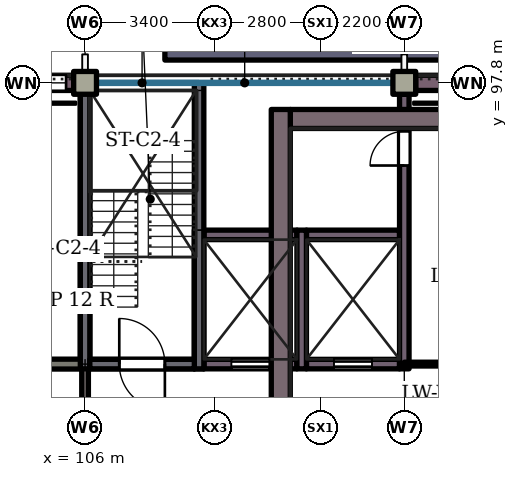
"""IFC4 building model, lengths in metres.
Left out: names, types, materials, properties, quantities, classifications, styles, units other than length and angle.
Written with IfcOpenShell. Run it as: python <this file> out.ifc"""

import sys

from ifc_helpers import new_model, si_unit, direction, frame, frame_2d, origin, origin_2d, place, context, subcontext, project, spatial, rectangle, extrude, element, fill, save


model = new_model("IFC4")
c1 = context("Model", 3, precision=1e-05, world=origin(), true_north=direction((0.0, 1.0)))
c2 = subcontext(c1, "Body", "Model", "MODEL_VIEW")
j1 = project(units=[si_unit("LENGTHUNIT", "METRE"), si_unit("PLANEANGLEUNIT", "RADIAN")], contexts=[c1])
p1 = place(None, origin())
s1 = spatial("IfcSite", under=j1, at=p1, CompositionType="ELEMENT")
p2 = place(p1, origin())
s2 = spatial("IfcBuilding", under=s1, at=p2, CompositionType="ELEMENT")
p3 = place(p2, frame((0.0, 0.0, 16.8)))
s3 = spatial("IfcBuildingStorey", under=s2, at=p3, CompositionType="ELEMENT", Elevation=16.8)
for number, where, z_axis, x_axis in (
    (1, (106.0, 97.8, 0.0), (0.0, 0.0, 1.0), (1.0, 0.0, 0.0)),
    (2, (114.4, 97.8, 0.0), (0.0, 0.0, 1.0), (1.0, 0.0, 0.0)),
):
    element("IfcColumn", number, at=place(p3, frame(where, z_axis=z_axis, x_axis=x_axis)), inside=s3, PredefinedType="COLUMN", context=c2, shape_type="SweptSolid", body=[
        extrude(rectangle(XDim=0.6, YDim=0.6, at=origin_2d()), origin(), (0.0, 0.0, 1.0), 4.2),
    ])
p4 = place(p3, frame((106.125, 90.4, 0.0), z_axis=(0.0, 0.0, 1.0), x_axis=(1.0, 0.0, 0.0)))
e3 = element("IfcWall", 3, at=p4, inside=s3, PredefinedType="SHEAR", context=c2, shape_type="SweptSolid", body=[
    extrude(rectangle(XDim=2.75, YDim=0.25, at=frame_2d((1.375, 0.0))), origin(), (0.0, 0.0, 1.0), 4.2),
])
p5 = place(p4, frame((0.775, 0.0, 0.0)))
e4 = element("IfcOpeningElement", 4, at=p5, cuts=e3, PredefinedType="OPENING", context=c2, shape_type="SweptSolid", body=[
    extrude(rectangle(XDim=1.2, YDim=2.1, at=frame_2d((0.6, 1.05))), frame((0.0, 0.135, 0.0), z_axis=(0.0, -1.0, 0.0), x_axis=(1.0, 0.0, 0.0)), (0.0, 0.0, 1.0), 0.27),
])
p6 = place(p3, frame((109.125, 90.4, 0.0), z_axis=(0.0, 0.0, 1.0), x_axis=(1.0, 0.0, 0.0)))
e5 = element("IfcWall", 5, at=p6, inside=s3, PredefinedType="SHEAR", context=c2, shape_type="SweptSolid", body=[
    extrude(rectangle(XDim=2.45, YDim=0.25, at=frame_2d((1.225, 0.0))), origin(), (0.0, 0.0, 1.0), 4.2),
])
p7 = place(p6, frame((0.725, 0.0, 0.0)))
e6 = element("IfcOpeningElement", 6, at=p7, cuts=e5, PredefinedType="OPENING", context=c2, shape_type="SweptSolid", body=[
    extrude(rectangle(XDim=1.0, YDim=2.1, at=frame_2d((0.5, 1.05))), frame((0.0, 0.135, 0.0), z_axis=(0.0, -1.0, 0.0), x_axis=(1.0, 0.0, 0.0)), (0.0, 0.0, 1.0), 0.27),
])
p8 = place(p3, frame((111.825, 90.4, 0.0), z_axis=(0.0, 0.0, 1.0), x_axis=(1.0, 0.0, 0.0)))
e7 = element("IfcWall", 7, at=p8, inside=s3, PredefinedType="SHEAR", context=c2, shape_type="SweptSolid", body=[
    extrude(rectangle(XDim=2.45, YDim=0.25, at=frame_2d((1.225, 0.0))), origin(), (0.0, 0.0, 1.0), 4.2),
])
p9 = place(p8, frame((0.725, 0.0, 0.0)))
e8 = element("IfcOpeningElement", 8, at=p9, cuts=e7, PredefinedType="OPENING", context=c2, shape_type="SweptSolid", body=[
    extrude(rectangle(XDim=1.0, YDim=2.1, at=frame_2d((0.5, 1.05))), frame((0.0, 0.135, 0.0), z_axis=(0.0, -1.0, 0.0), x_axis=(1.0, 0.0, 0.0)), (0.0, 0.0, 1.0), 0.27),
])
for number, where, z_axis, x_axis in (
    (9, (109.125, 93.8, 0.0), (0.0, 0.0, 1.0), (1.0, 0.0, 0.0)),
    (10, (111.825, 93.8, 0.0), (0.0, 0.0, 1.0), (1.0, 0.0, 0.0)),
):
    element("IfcWall", number, at=place(p3, frame(where, z_axis=z_axis, x_axis=x_axis)), inside=s3, PredefinedType="SHEAR", context=c2, shape_type="SweptSolid", body=[
        extrude(rectangle(XDim=2.45, YDim=0.25, at=frame_2d((1.225, 0.0))), origin(), (0.0, 0.0, 1.0), 4.2),
    ])
p10 = place(p3, frame((106.0, 90.275, 0.0), z_axis=(0.0, 0.0, 1.0), x_axis=(0.0, 1.0, 0.0)))
e11 = element("IfcWall", 11, at=p10, inside=s3, PredefinedType="SHEAR", context=c2, shape_type="SweptSolid", body=[
    extrude(rectangle(XDim=7.225, YDim=0.25, at=frame_2d((3.613, 0.0))), origin(), (0.0, 0.0, 1.0), 4.2),
])
for number, where, z_axis, x_axis in (
    (12, (109.0, 90.275, 0.0), (0.0, 0.0, 1.0), (0.0, 1.0, 0.0)),
    (13, (111.7, 90.275, 0.0), (0.0, 0.0, 1.0), (0.0, 1.0, 0.0)),
):
    element("IfcWall", number, at=place(p3, frame(where, z_axis=z_axis, x_axis=x_axis)), inside=s3, PredefinedType="SHEAR", context=c2, shape_type="SweptSolid", body=[
        extrude(rectangle(XDim=3.65, YDim=0.25, at=frame_2d((1.825, 0.0))), origin(), (0.0, 0.0, 1.0), 4.2),
    ])
p11 = place(p3, frame((114.4, 90.275, 0.0), z_axis=(0.0, 0.0, 1.0), x_axis=(0.0, 1.0, 0.0)))
e14 = element("IfcWall", 14, at=p11, inside=s3, PredefinedType="SHEAR", context=c2, shape_type="SweptSolid", body=[
    extrude(rectangle(XDim=7.225, YDim=0.25, at=frame_2d((3.613, 0.0))), origin(), (0.0, 0.0, 1.0), 4.2),
])
p12 = place(p11, frame((5.35, 0.0, 0.0)))
e15 = element("IfcOpeningElement", 15, at=p12, cuts=e14, PredefinedType="OPENING", context=c2, shape_type="SweptSolid", body=[
    extrude(rectangle(XDim=0.9, YDim=2.1, at=frame_2d((0.45, 1.05))), frame((0.0, 0.135, 0.0), z_axis=(0.0, -1.0, 0.0), x_axis=(1.0, 0.0, 0.0)), (0.0, 0.0, 1.0), 0.27),
])
p13 = place(p3, frame((97.9, 97.8, 0.0), z_axis=(0.0, 0.0, 1.0), x_axis=(1.0, 0.0, 0.0)))
e16 = element("IfcWall", 16, at=p13, inside=s3, PredefinedType="SOLIDWALL", context=c2, shape_type="SweptSolid", body=[
    extrude(rectangle(XDim=7.8, YDim=0.4, at=frame_2d((3.9, 0.0))), origin(), (0.0, 0.0, 1.0), 3.3),
])
p14 = place(p13, frame((0.2, 0.0, 0.9)))
e17 = element("IfcOpeningElement", 17, at=p14, cuts=e16, PredefinedType="OPENING", context=c2, shape_type="SweptSolid", body=[
    extrude(rectangle(XDim=1.8, YDim=2.1, at=frame_2d((0.9, 1.05))), frame((0.0, 0.21, 0.0), z_axis=(0.0, -1.0, 0.0), x_axis=(1.0, 0.0, 0.0)), (0.0, 0.0, 1.0), 0.42),
])
p15 = place(p13, frame((3.0, 0.0, 0.9)))
e18 = element("IfcOpeningElement", 18, at=p15, cuts=e16, PredefinedType="OPENING", context=c2, shape_type="SweptSolid", body=[
    extrude(rectangle(XDim=1.8, YDim=2.1, at=frame_2d((0.9, 1.05))), frame((0.0, 0.21, 0.0), z_axis=(0.0, -1.0, 0.0), x_axis=(1.0, 0.0, 0.0)), (0.0, 0.0, 1.0), 0.42),
])
p16 = place(p13, frame((5.8, 0.0, 0.9)))
e19 = element("IfcOpeningElement", 19, at=p16, cuts=e16, PredefinedType="OPENING", context=c2, shape_type="SweptSolid", body=[
    extrude(rectangle(XDim=1.8, YDim=2.1, at=frame_2d((0.9, 1.05))), frame((0.0, 0.21, 0.0), z_axis=(0.0, -1.0, 0.0), x_axis=(1.0, 0.0, 0.0)), (0.0, 0.0, 1.0), 0.42),
])
p17 = place(p3, frame((114.7, 97.8, 0.0), z_axis=(0.0, 0.0, 1.0), x_axis=(1.0, 0.0, 0.0)))
e20 = element("IfcWall", 20, at=p17, inside=s3, PredefinedType="SOLIDWALL", context=c2, shape_type="SweptSolid", body=[
    extrude(rectangle(XDim=7.8, YDim=0.4, at=frame_2d((3.9, 0.0))), origin(), (0.0, 0.0, 1.0), 3.3),
])
p18 = place(p17, frame((0.8, 0.0, 2.1)))
e21 = element("IfcOpeningElement", 21, at=p18, cuts=e20, PredefinedType="OPENING", context=c2, shape_type="SweptSolid", body=[
    extrude(rectangle(XDim=0.6, YDim=0.9, at=frame_2d((0.3, 0.45))), frame((0.0, 0.21, 0.0), z_axis=(0.0, -1.0, 0.0), x_axis=(1.0, 0.0, 0.0)), (0.0, 0.0, 1.0), 0.42),
])
p19 = place(p17, frame((3.525, 0.0, 2.1)))
e22 = element("IfcOpeningElement", 22, at=p19, cuts=e20, PredefinedType="OPENING", context=c2, shape_type="SweptSolid", body=[
    extrude(rectangle(XDim=0.75, YDim=0.9, at=frame_2d((0.375, 0.45))), frame((0.0, 0.21, 0.0), z_axis=(0.0, -1.0, 0.0), x_axis=(1.0, 0.0, 0.0)), (0.0, 0.0, 1.0), 0.42),
])
p20 = place(p17, frame((6.4, 0.0, 2.1)))
e23 = element("IfcOpeningElement", 23, at=p20, cuts=e20, PredefinedType="OPENING", context=c2, shape_type="SweptSolid", body=[
    extrude(rectangle(XDim=0.6, YDim=0.9, at=frame_2d((0.3, 0.45))), frame((0.0, 0.21, 0.0), z_axis=(0.0, -1.0, 0.0), x_axis=(1.0, 0.0, 0.0)), (0.0, 0.0, 1.0), 0.42),
])
p21 = place(p3, frame((111.4, 96.85, 4.2), z_axis=(0.0, 0.0, 1.0), x_axis=(1.0, 0.0, 0.0)))
e24 = element("IfcWall", 24, at=p21, inside=s3, PredefinedType="SOLIDWALL", context=c2, shape_type="SweptSolid", body=[
    extrude(rectangle(XDim=9.0, YDim=0.5, at=frame_2d((4.5, 0.0))), origin(), (0.0, 0.0, 1.0), 0.9),
])
p22 = place(p3, frame((111.15, 88.3, 4.2), z_axis=(0.0, 0.0, 1.0), x_axis=(0.0, 1.0, 0.0)))
e25 = element("IfcWall", 25, at=p22, inside=s3, PredefinedType="SOLIDWALL", context=c2, shape_type="SweptSolid", body=[
    extrude(rectangle(XDim=8.8, YDim=0.5, at=frame_2d((4.4, 0.0))), origin(), (0.0, 0.0, 1.0), 0.9),
])
p23 = place(p3, frame((108.1, 98.9, 0.0), z_axis=(0.0, 0.0, 1.0), x_axis=(1.0, 0.0, 0.0)))
e26 = element("IfcWall", 26, at=p23, inside=s3, PredefinedType="STANDARD", context=c2, shape_type="SweptSolid", body=[
    extrude(rectangle(XDim=12.6, YDim=1.0, at=frame_2d((6.3, 0.0))), origin(), (0.0, 0.0, 1.0), 0.6),
])
p24 = place(p3, frame((97.6, 90.4, 0.0), z_axis=(0.0, 0.0, 1.0), x_axis=(1.0, 0.0, 0.0)))
e27 = element("IfcWall", 27, at=p24, inside=s3, PredefinedType="PARTITIONING", context=c2, shape_type="SweptSolid", body=[
    extrude(rectangle(XDim=8.4, YDim=0.26, at=frame_2d((4.2, 0.0))), origin(), (0.0, 0.0, 1.0), 3.9),
])
p25 = place(p24, frame((3.45, 0.0, 0.0)))
e28 = element("IfcOpeningElement", 28, at=p25, cuts=e27, PredefinedType="OPENING", context=c2, shape_type="SweptSolid", body=[
    extrude(rectangle(XDim=1.5, YDim=2.1, at=frame_2d((0.75, 1.05))), frame((0.0, 0.14, 0.0), z_axis=(0.0, -1.0, 0.0), x_axis=(1.0, 0.0, 0.0)), (0.0, 0.0, 1.0), 0.28),
])
p26 = place(p3, frame((114.4, 90.4, 0.0), z_axis=(0.0, 0.0, 1.0), x_axis=(1.0, 0.0, 0.0)))
e29 = element("IfcWall", 29, at=p26, inside=s3, PredefinedType="PARTITIONING", context=c2, shape_type="SweptSolid", body=[
    extrude(rectangle(XDim=8.4, YDim=0.1, at=frame_2d((4.2, 0.0))), origin(), (0.0, 0.0, 1.0), 3.9),
])
p27 = place(p26, frame((1.35, 0.0, 0.0)))
e30 = element("IfcOpeningElement", 30, at=p27, cuts=e29, PredefinedType="OPENING", context=c2, shape_type="SweptSolid", body=[
    extrude(rectangle(XDim=0.9, YDim=2.1, at=frame_2d((0.45, 1.05))), frame((0.0, 0.06, 0.0), z_axis=(0.0, -1.0, 0.0), x_axis=(1.0, 0.0, 0.0)), (0.0, 0.0, 1.0), 0.12),
])
p28 = place(p26, frame((4.225, 0.0, 0.0)))
e31 = element("IfcOpeningElement", 31, at=p28, cuts=e29, PredefinedType="OPENING", context=c2, shape_type="SweptSolid", body=[
    extrude(rectangle(XDim=1.15, YDim=2.1, at=frame_2d((0.575, 1.05))), frame((0.0, 0.06, 0.0), z_axis=(0.0, -1.0, 0.0), x_axis=(1.0, 0.0, 0.0)), (0.0, 0.0, 1.0), 0.12),
])
p29 = place(p26, frame((6.15, 0.0, 0.0)))
e32 = element("IfcOpeningElement", 32, at=p29, cuts=e29, PredefinedType="OPENING", context=c2, shape_type="SweptSolid", body=[
    extrude(rectangle(XDim=0.9, YDim=2.1, at=frame_2d((0.45, 1.05))), frame((0.0, 0.06, 0.0), z_axis=(0.0, -1.0, 0.0), x_axis=(1.0, 0.0, 0.0)), (0.0, 0.0, 1.0), 0.12),
])
p30 = place(p3, frame((106.0, 87.9, 0.0), z_axis=(0.0, 0.0, 1.0), x_axis=(0.0, 1.0, 0.0)))
e33 = element("IfcWall", 33, at=p30, inside=s3, PredefinedType="PARTITIONING", context=c2, shape_type="SweptSolid", body=[
    extrude(rectangle(XDim=2.5, YDim=0.175, at=frame_2d((1.25, 0.0))), origin(), (0.0, 0.0, 1.0), 3.0),
])
p31 = place(p3, frame((109.0, 93.925, 0.0), z_axis=(0.0, 0.0, 1.0), x_axis=(0.0, 1.0, 0.0)))
e34 = element("IfcWall", 34, at=p31, inside=s3, PredefinedType="PARTITIONING", context=c2, shape_type="SweptSolid", body=[
    extrude(rectangle(XDim=3.675, YDim=0.15, at=frame_2d((1.837, 0.0))), origin(), (0.0, 0.0, 1.0), 3.9),
])
for number, where, z_axis, x_axis in (
    (35, (106.0, 90.275, 4.2), (0.0, 0.0, 1.0), (0.0, 1.0, 0.0)),
    (36, (109.0, 90.275, 4.2), (0.0, 0.0, 1.0), (0.0, 1.0, 0.0)),
):
    element("IfcWall", number, at=place(p3, frame(where, z_axis=z_axis, x_axis=x_axis)), inside=s3, PredefinedType="SHEAR", context=c2, shape_type="SweptSolid", body=[
        extrude(rectangle(XDim=7.525, YDim=0.25, at=frame_2d((3.763, 0.0))), origin(), (0.0, 0.0, 1.0), 3.5),
    ])
p32 = place(p3, frame((106.125, 90.4, 4.2), z_axis=(0.0, 0.0, 1.0), x_axis=(1.0, 0.0, 0.0)))
e37 = element("IfcWall", 37, at=p32, inside=s3, PredefinedType="SHEAR", context=c2, shape_type="SweptSolid", body=[
    extrude(rectangle(XDim=2.75, YDim=0.25, at=frame_2d((1.375, 0.0))), origin(), (0.0, 0.0, 1.0), 3.5),
])
p33 = place(p32, frame((0.775, 0.0, 0.0)))
e38 = element("IfcOpeningElement", 38, at=p33, cuts=e37, PredefinedType="OPENING", context=c2, shape_type="SweptSolid", body=[
    extrude(rectangle(XDim=1.2, YDim=2.1, at=frame_2d((0.6, 1.05))), frame((0.0, 0.135, 0.0), z_axis=(0.0, -1.0, 0.0), x_axis=(1.0, 0.0, 0.0)), (0.0, 0.0, 1.0), 0.27),
])
p34 = place(p16, origin())
e39 = element("IfcWindow", 39, at=p34, inside=s3, PartitioningType="SINGLE_PANEL", PredefinedType="WINDOW", context=c2, shape_type="SweptSolid", body=[
    extrude(rectangle(XDim=1.8, YDim=2.1, at=frame_2d((0.9, 1.05))), frame((0.0, 0.03, 0.0), z_axis=(0.0, -1.0, 0.0), x_axis=(1.0, 0.0, 0.0)), (0.0, 0.0, 1.0), 0.06),
])
fill(e19, e39)
p35 = place(p12, origin())
e40 = element("IfcDoor", 40, at=p35, inside=s3, OperationType="SINGLE_SWING_LEFT", PredefinedType="DOOR", context=c2, shape_type="SweptSolid", body=[
    extrude(rectangle(XDim=0.9, YDim=2.1, at=frame_2d((0.45, 1.05))), frame((0.0, 0.025, 0.0), z_axis=(0.0, -1.0, 0.0), x_axis=(1.0, 0.0, 0.0)), (0.0, 0.0, 1.0), 0.05),
])
fill(e15, e40)
p36 = place(p5, origin())
e41 = element("IfcDoor", 41, at=p36, inside=s3, OperationType="SINGLE_SWING_LEFT", PredefinedType="DOOR", context=c2, shape_type="SweptSolid", body=[
    extrude(rectangle(XDim=1.2, YDim=2.1, at=frame_2d((0.6, 1.05))), frame((0.0, 0.025, 0.0), z_axis=(0.0, -1.0, 0.0), x_axis=(1.0, 0.0, 0.0)), (0.0, 0.0, 1.0), 0.05),
])
fill(e4, e41)
p37 = place(p7, origin())
e42 = element("IfcDoor", 42, at=p37, inside=s3, OperationType="SLIDING_TO_LEFT", PredefinedType="DOOR", context=c2, shape_type="SweptSolid", body=[
    extrude(rectangle(XDim=1.0, YDim=2.1, at=frame_2d((0.5, 1.05))), frame((0.0, 0.025, 0.0), z_axis=(0.0, -1.0, 0.0), x_axis=(1.0, 0.0, 0.0)), (0.0, 0.0, 1.0), 0.05),
])
fill(e6, e42)
p38 = place(p9, origin())
e43 = element("IfcDoor", 43, at=p38, inside=s3, OperationType="SLIDING_TO_LEFT", PredefinedType="DOOR", context=c2, shape_type="SweptSolid", body=[
    extrude(rectangle(XDim=1.0, YDim=2.1, at=frame_2d((0.5, 1.05))), frame((0.0, 0.025, 0.0), z_axis=(0.0, -1.0, 0.0), x_axis=(1.0, 0.0, 0.0)), (0.0, 0.0, 1.0), 0.05),
])
fill(e8, e43)
p39 = place(p33, origin())
e44 = element("IfcDoor", 44, at=p39, inside=s3, OperationType="SINGLE_SWING_RIGHT", PredefinedType="DOOR", context=c2, shape_type="SweptSolid", body=[
    extrude(rectangle(XDim=1.2, YDim=2.1, at=frame_2d((0.6, 1.05))), frame((0.0, 0.025, 0.0), z_axis=(0.0, -1.0, 0.0), x_axis=(1.0, 0.0, 0.0)), (0.0, 0.0, 1.0), 0.05),
])
fill(e38, e44)
save(model, sys.argv[1])
